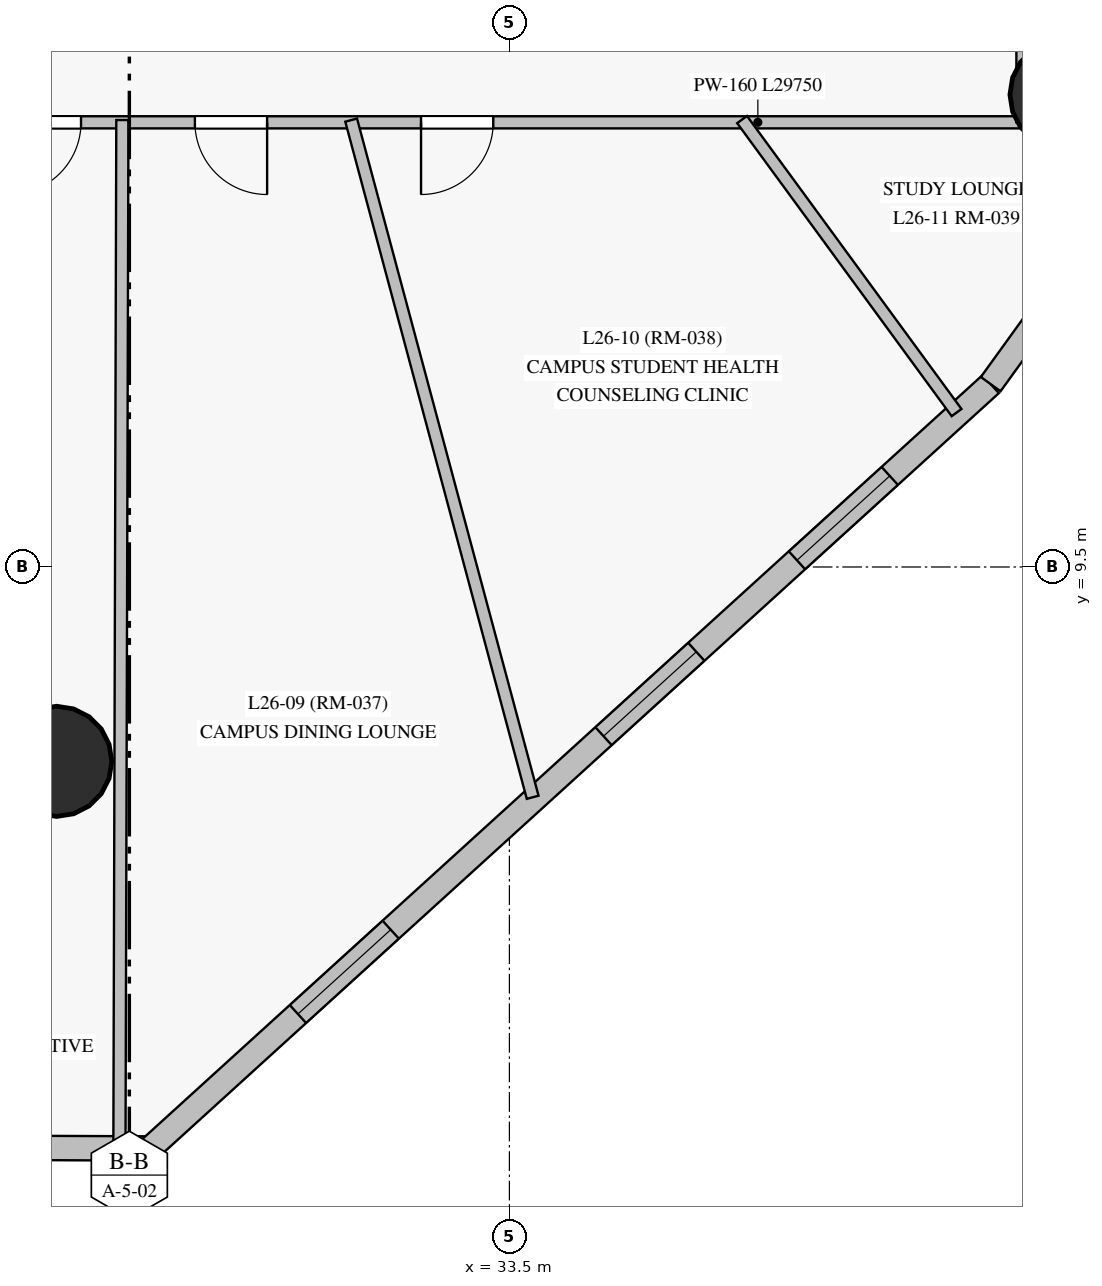
"""IFC4 building model, lengths in metres.
Left out: names, types, materials, properties, quantities, classifications, styles, units other than length and angle.
Written with IfcOpenShell. Run it as: python <this file> out.ifc"""

import sys

from ifc_helpers import new_model, si_unit, direction, frame, frame_2d, origin, origin_with_axes, origin_2d, place, context, subcontext, project, spatial, rectangle, circle, extrude, source, transform, mapped, element, fill, save


model = new_model("IFC4")
c1 = context("Model", 3, precision=1e-05, world=origin(), true_north=direction((0.0, 1.0)))
c2 = subcontext(c1, "Body", "Model", "MODEL_VIEW")
j1 = project(units=[si_unit("LENGTHUNIT", "METRE"), si_unit("PLANEANGLEUNIT", "RADIAN")], contexts=[c1])
p1 = place(None, origin())
s1 = spatial("IfcSite", under=j1, at=p1, CompositionType="ELEMENT")
p2 = place(p1, origin())
s2 = spatial("IfcBuilding", under=s1, at=p2, CompositionType="ELEMENT")
p3 = place(p2, frame((0.0, 0.0, 99.25)))
s3 = spatial("IfcBuildingStorey", under=s2, at=p3, CompositionType="ELEMENT", Elevation=99.25)
m1 = source(origin_with_axes(), c2, "Body", "SweptSolid", [
    extrude(circle(Radius=0.725, at=origin_2d()), origin(), (0.0, 0.0, 1.0), 3.05),
])
for number, where, z_axis, x_axis in (
    (1, (27.544, 6.943, 0.0), (0.0, 0.0, 1.0), (1.0, 0.0, 0.0)),
    (2, (40.81, 15.714, 0.0), (0.0, 0.0, 1.0), (1.0, 0.0, 0.0)),
):
    element("IfcColumn", number, at=place(p3, frame(where, z_axis=z_axis, x_axis=x_axis)), inside=s3, PredefinedType="COLUMN", context=c2, shape_type="MappedRepresentation", body=[
        mapped(m1, transform((0.0, 0.0, 0.0), scale=1.0)),
    ])
p4 = place(p3, frame((18.773, 1.894, 0.0), z_axis=(0.0, 0.0, 1.0), x_axis=(0.999990449776, -0.004370395549, 0.0)))
e3 = element("IfcWall", 3, at=p4, inside=s3, PredefinedType="SOLIDWALL", context=c2, shape_type="SweptSolid", body=[
    extrude(rectangle(XDim=9.999, YDim=0.32, at=frame_2d((5.0, 0.0))), origin(), (0.0, 0.0, 1.0), 2.825),
])
p5 = place(p4, frame((1.95, 0.0, 0.85)))
e4 = element("IfcOpeningElement", 4, at=p5, cuts=e3, PredefinedType="OPENING", context=c2, shape_type="SweptSolid", body=[
    extrude(rectangle(XDim=1.65, YDim=1.65, at=frame_2d((0.825, 0.825))), frame((0.0, 0.17, 0.0), z_axis=(0.0, -1.0, 0.0), x_axis=(1.0, 0.0, 0.0)), (0.0, 0.0, 1.0), 0.34),
])
p6 = place(p4, frame((6.41, 0.0, 0.85)))
e5 = element("IfcOpeningElement", 5, at=p6, cuts=e3, PredefinedType="OPENING", context=c2, shape_type="SweptSolid", body=[
    extrude(rectangle(XDim=1.65, YDim=1.65, at=frame_2d((0.825, 0.825))), frame((0.0, 0.17, 0.0), z_axis=(0.0, -1.0, 0.0), x_axis=(1.0, 0.0, 0.0)), (0.0, 0.0, 1.0), 0.34),
])
p7 = place(p3, frame((28.773, 1.85, 0.0), z_axis=(0.0, 0.0, 1.0), x_axis=(0.739889815612, 0.672728073409, 0.0)))
e6 = element("IfcWall", 6, at=p7, inside=s3, PredefinedType="SOLIDWALL", context=c2, shape_type="SweptSolid", body=[
    extrude(rectangle(XDim=14.948, YDim=0.32, at=frame_2d((7.474, 0.0))), origin(), (0.0, 0.0, 1.0), 2.825),
])
p8 = place(p7, frame((2.629, 0.0, 0.85)))
e7 = element("IfcOpeningElement", 7, at=p8, cuts=e6, PredefinedType="OPENING", context=c2, shape_type="SweptSolid", body=[
    extrude(rectangle(XDim=1.65, YDim=1.65, at=frame_2d((0.825, 0.825))), frame((0.0, 0.17, 0.0), z_axis=(0.0, -1.0, 0.0), x_axis=(1.0, 0.0, 0.0)), (0.0, 0.0, 1.0), 0.34),
])
p9 = place(p7, frame((8.063, 0.0, 0.85)))
e8 = element("IfcOpeningElement", 8, at=p9, cuts=e6, PredefinedType="OPENING", context=c2, shape_type="SweptSolid", body=[
    extrude(rectangle(XDim=1.65, YDim=1.65, at=frame_2d((0.825, 0.825))), frame((0.0, 0.17, 0.0), z_axis=(0.0, -1.0, 0.0), x_axis=(1.0, 0.0, 0.0)), (0.0, 0.0, 1.0), 0.34),
])
p10 = place(p7, frame((11.502, 0.0, 0.85)))
e9 = element("IfcOpeningElement", 9, at=p10, cuts=e6, PredefinedType="OPENING", context=c2, shape_type="SweptSolid", body=[
    extrude(rectangle(XDim=1.65, YDim=1.65, at=frame_2d((0.825, 0.825))), frame((0.0, 0.17, 0.0), z_axis=(0.0, -1.0, 0.0), x_axis=(1.0, 0.0, 0.0)), (0.0, 0.0, 1.0), 0.34),
])
p11 = place(p3, frame((39.832, 11.906, 0.0), z_axis=(0.0, 0.0, 1.0), x_axis=(0.585524008993, 0.810655065298, 0.0)))
e10 = element("IfcWall", 10, at=p11, inside=s3, PredefinedType="SOLIDWALL", context=c2, shape_type="SweptSolid", body=[
    extrude(rectangle(XDim=10.391, YDim=0.32, at=frame_2d((5.196, 0.0))), origin(), (0.0, 0.0, 1.0), 2.825),
])
p12 = place(p11, frame((1.255, 0.0, 0.85)))
e11 = element("IfcOpeningElement", 11, at=p12, cuts=e10, PredefinedType="OPENING", context=c2, shape_type="SweptSolid", body=[
    extrude(rectangle(XDim=1.65, YDim=1.65, at=frame_2d((0.825, 0.825))), frame((0.0, 0.17, 0.0), z_axis=(0.0, -1.0, 0.0), x_axis=(1.0, 0.0, 0.0)), (0.0, 0.0, 1.0), 0.34),
])
p13 = place(p11, frame((4.656, 0.0, 0.85)))
e12 = element("IfcOpeningElement", 12, at=p13, cuts=e10, PredefinedType="OPENING", context=c2, shape_type="SweptSolid", body=[
    extrude(rectangle(XDim=1.65, YDim=1.65, at=frame_2d((0.825, 0.825))), frame((0.0, 0.17, 0.0), z_axis=(0.0, -1.0, 0.0), x_axis=(1.0, 0.0, 0.0)), (0.0, 0.0, 1.0), 0.34),
])
p14 = place(p11, frame((8.091, 0.0, 0.85)))
e13 = element("IfcOpeningElement", 13, at=p14, cuts=e10, PredefinedType="OPENING", context=c2, shape_type="SweptSolid", body=[
    extrude(rectangle(XDim=1.65, YDim=1.65, at=frame_2d((0.825, 0.825))), frame((0.0, 0.17, 0.0), z_axis=(0.0, -1.0, 0.0), x_axis=(1.0, 0.0, 0.0)), (0.0, 0.0, 1.0), 0.34),
])
p15 = place(p3, frame((40.25, 15.35, 0.0), z_axis=(0.0, 0.0, 1.0), x_axis=(-1.0, 0.0, 0.0)))
e14 = element("IfcWall", 14, at=p15, inside=s3, PredefinedType="PARTITIONING", context=c2, shape_type="SweptSolid", body=[
    extrude(rectangle(XDim=29.75, YDim=0.16, at=frame_2d((14.875, 0.0))), origin(), (0.0, 0.0, 1.0), 2.225),
])
p16 = place(p15, frame((24.369, 0.0, 0.0)))
e15 = element("IfcOpeningElement", 15, at=p16, cuts=e14, PredefinedType="OPENING", context=c2, shape_type="SweptSolid", body=[
    extrude(rectangle(XDim=0.95, YDim=2.15, at=frame_2d((0.475, 1.075))), frame((0.0, 0.09, 0.0), z_axis=(0.0, -1.0, 0.0), x_axis=(1.0, 0.0, 0.0)), (0.0, 0.0, 1.0), 0.18),
])
p17 = place(p15, frame((21.498, 0.0, 0.0)))
e16 = element("IfcOpeningElement", 16, at=p17, cuts=e14, PredefinedType="OPENING", context=c2, shape_type="SweptSolid", body=[
    extrude(rectangle(XDim=0.95, YDim=2.15, at=frame_2d((0.475, 1.075))), frame((0.0, 0.09, 0.0), z_axis=(0.0, -1.0, 0.0), x_axis=(1.0, 0.0, 0.0)), (0.0, 0.0, 1.0), 0.18),
])
p18 = place(p15, frame((18.373, 0.0, 0.0)))
e17 = element("IfcOpeningElement", 17, at=p18, cuts=e14, PredefinedType="OPENING", context=c2, shape_type="SweptSolid", body=[
    extrude(rectangle(XDim=0.95, YDim=2.15, at=frame_2d((0.475, 1.075))), frame((0.0, 0.09, 0.0), z_axis=(0.0, -1.0, 0.0), x_axis=(1.0, 0.0, 0.0)), (0.0, 0.0, 1.0), 0.18),
])
p19 = place(p15, frame((16.347, 0.0, 0.0)))
e18 = element("IfcOpeningElement", 18, at=p19, cuts=e14, PredefinedType="OPENING", context=c2, shape_type="SweptSolid", body=[
    extrude(rectangle(XDim=0.95, YDim=2.15, at=frame_2d((0.475, 1.075))), frame((0.0, 0.09, 0.0), z_axis=(0.0, -1.0, 0.0), x_axis=(1.0, 0.0, 0.0)), (0.0, 0.0, 1.0), 0.18),
])
p20 = place(p15, frame((14.4, 0.0, 0.0)))
e19 = element("IfcOpeningElement", 19, at=p20, cuts=e14, PredefinedType="OPENING", context=c2, shape_type="SweptSolid", body=[
    extrude(rectangle(XDim=0.95, YDim=2.15, at=frame_2d((0.475, 1.075))), frame((0.0, 0.09, 0.0), z_axis=(0.0, -1.0, 0.0), x_axis=(1.0, 0.0, 0.0)), (0.0, 0.0, 1.0), 0.18),
])
p21 = place(p15, frame((12.386, 0.0, 0.0)))
e20 = element("IfcOpeningElement", 20, at=p21, cuts=e14, PredefinedType="OPENING", context=c2, shape_type="SweptSolid", body=[
    extrude(rectangle(XDim=0.95, YDim=2.15, at=frame_2d((0.475, 1.075))), frame((0.0, 0.09, 0.0), z_axis=(0.0, -1.0, 0.0), x_axis=(1.0, 0.0, 0.0)), (0.0, 0.0, 1.0), 0.18),
])
p22 = place(p15, frame((9.938, 0.0, 0.0)))
e21 = element("IfcOpeningElement", 21, at=p22, cuts=e14, PredefinedType="OPENING", context=c2, shape_type="SweptSolid", body=[
    extrude(rectangle(XDim=0.95, YDim=2.15, at=frame_2d((0.475, 1.075))), frame((0.0, 0.09, 0.0), z_axis=(0.0, -1.0, 0.0), x_axis=(1.0, 0.0, 0.0)), (0.0, 0.0, 1.0), 0.18),
])
p23 = place(p15, frame((6.962, 0.0, 0.0)))
e22 = element("IfcOpeningElement", 22, at=p23, cuts=e14, PredefinedType="OPENING", context=c2, shape_type="SweptSolid", body=[
    extrude(rectangle(XDim=0.95, YDim=2.15, at=frame_2d((0.475, 1.075))), frame((0.0, 0.09, 0.0), z_axis=(0.0, -1.0, 0.0), x_axis=(1.0, 0.0, 0.0)), (0.0, 0.0, 1.0), 0.18),
])
p24 = place(p3, frame((40.25, 37.65, 0.0), z_axis=(0.0, 0.0, 1.0), x_axis=(0.0, -1.0, 0.0)))
e23 = element("IfcWall", 23, at=p24, inside=s3, PredefinedType="PARTITIONING", context=c2, shape_type="SweptSolid", body=[
    extrude(rectangle(XDim=22.3, YDim=0.16, at=frame_2d((11.15, 0.0))), origin(), (0.0, 0.0, 1.0), 2.225),
])
p25 = place(p24, frame((18.866, 0.0, 0.0)))
e24 = element("IfcOpeningElement", 24, at=p25, cuts=e23, PredefinedType="OPENING", context=c2, shape_type="SweptSolid", body=[
    extrude(rectangle(XDim=0.95, YDim=2.15, at=frame_2d((0.475, 1.075))), frame((0.0, 0.09, 0.0), z_axis=(0.0, -1.0, 0.0), x_axis=(1.0, 0.0, 0.0)), (0.0, 0.0, 1.0), 0.18),
])
p26 = place(p24, frame((11.015, 0.0, 0.0)))
e25 = element("IfcOpeningElement", 25, at=p26, cuts=e23, PredefinedType="OPENING", context=c2, shape_type="SweptSolid", body=[
    extrude(rectangle(XDim=0.95, YDim=2.15, at=frame_2d((0.475, 1.075))), frame((0.0, 0.09, 0.0), z_axis=(0.0, -1.0, 0.0), x_axis=(1.0, 0.0, 0.0)), (0.0, 0.0, 1.0), 0.18),
])
p27 = place(p24, frame((8.866, 0.0, 0.0)))
e26 = element("IfcOpeningElement", 26, at=p27, cuts=e23, PredefinedType="OPENING", context=c2, shape_type="SweptSolid", body=[
    extrude(rectangle(XDim=0.95, YDim=2.15, at=frame_2d((0.475, 1.075))), frame((0.0, 0.09, 0.0), z_axis=(0.0, -1.0, 0.0), x_axis=(1.0, 0.0, 0.0)), (0.0, 0.0, 1.0), 0.18),
])
p28 = place(p24, frame((6.84, 0.0, 0.0)))
e27 = element("IfcOpeningElement", 27, at=p28, cuts=e23, PredefinedType="OPENING", context=c2, shape_type="SweptSolid", body=[
    extrude(rectangle(XDim=0.95, YDim=2.15, at=frame_2d((0.475, 1.075))), frame((0.0, 0.09, 0.0), z_axis=(0.0, -1.0, 0.0), x_axis=(1.0, 0.0, 0.0)), (0.0, 0.0, 1.0), 0.18),
])
p29 = place(p24, frame((4.56, 0.0, 0.0)))
e28 = element("IfcOpeningElement", 28, at=p29, cuts=e23, PredefinedType="OPENING", context=c2, shape_type="SweptSolid", body=[
    extrude(rectangle(XDim=0.95, YDim=2.15, at=frame_2d((0.475, 1.075))), frame((0.0, 0.09, 0.0), z_axis=(0.0, -1.0, 0.0), x_axis=(1.0, 0.0, 0.0)), (0.0, 0.0, 1.0), 0.18),
])
p30 = place(p24, frame((0.915, 0.0, 0.0)))
e29 = element("IfcOpeningElement", 29, at=p30, cuts=e23, PredefinedType="OPENING", context=c2, shape_type="SweptSolid", body=[
    extrude(rectangle(XDim=0.95, YDim=2.15, at=frame_2d((0.475, 1.075))), frame((0.0, 0.09, 0.0), z_axis=(0.0, -1.0, 0.0), x_axis=(1.0, 0.0, 0.0)), (0.0, 0.0, 1.0), 0.18),
])
p31 = place(p3, frame((28.408, 15.38, 0.0), z_axis=(0.0, 0.0, 1.0), x_axis=(-0.002856666281, -0.999995919721, 0.0)))
e30 = element("IfcWall", 30, at=p31, inside=s3, PredefinedType="PARTITIONING", context=c2, shape_type="SweptSolid", body=[
    extrude(rectangle(XDim=13.503, YDim=0.16, at=frame_2d((6.751, 0.0))), origin(), (0.0, 0.0, 1.0), 2.825),
])
p32 = place(p3, frame((31.418, 15.379, 0.0), z_axis=(0.0, 0.0, 1.0), x_axis=(0.258881626797, -0.965909055402, 0.0)))
e31 = element("IfcWall", 31, at=p32, inside=s3, PredefinedType="PARTITIONING", context=c2, shape_type="SweptSolid", body=[
    extrude(rectangle(XDim=9.223, YDim=0.16, at=frame_2d((4.612, 0.0))), origin(), (0.0, 0.0, 1.0), 2.825),
])
p33 = place(p3, frame((36.561, 15.386, 0.0), z_axis=(0.0, 0.0, 1.0), x_axis=(0.590678841896, -0.806906751574, 0.0)))
e32 = element("IfcWall", 32, at=p33, inside=s3, PredefinedType="PARTITIONING", context=c2, shape_type="SweptSolid", body=[
    extrude(rectangle(XDim=4.777, YDim=0.16, at=frame_2d((2.389, 0.0))), origin(), (0.0, 0.0, 1.0), 2.825),
])
m2 = source(origin_with_axes(), c2, "Body", "SweptSolid", [
    extrude(rectangle(XDim=1.65, YDim=1.65, at=frame_2d((0.825, 0.825))), frame((0.0, 0.03, 0.0), z_axis=(0.0, -1.0, 0.0), x_axis=(1.0, 0.0, 0.0)), (0.0, 0.0, 1.0), 0.06),
])
p34 = place(p8, origin())
e33 = element("IfcWindow", 33, at=p34, inside=s3, PartitioningType="SINGLE_PANEL", PredefinedType="WINDOW", context=c2, shape_type="MappedRepresentation", body=[
    mapped(m2, transform((0.0, 0.0, 0.0), scale=1.0)),
])
fill(e7, e33)
p35 = place(p9, origin())
e34 = element("IfcWindow", 34, at=p35, inside=s3, PartitioningType="SINGLE_PANEL", PredefinedType="WINDOW", context=c2, shape_type="MappedRepresentation", body=[
    mapped(m2, transform((0.0, 0.0, 0.0), scale=1.0)),
])
fill(e8, e34)
p36 = place(p10, origin())
e35 = element("IfcWindow", 35, at=p36, inside=s3, PartitioningType="SINGLE_PANEL", PredefinedType="WINDOW", context=c2, shape_type="MappedRepresentation", body=[
    mapped(m2, transform((0.0, 0.0, 0.0), scale=1.0)),
])
fill(e9, e35)
m3 = source(origin_with_axes(), c2, "Body", "SweptSolid", [
    extrude(rectangle(XDim=0.95, YDim=2.15, at=frame_2d((0.475, 1.075))), frame((0.0, 0.025, 0.0), z_axis=(0.0, -1.0, 0.0), x_axis=(1.0, 0.0, 0.0)), (0.0, 0.0, 1.0), 0.05),
])
p37 = place(p21, origin())
e36 = element("IfcDoor", 36, at=p37, inside=s3, OperationType="SINGLE_SWING_RIGHT", PredefinedType="DOOR", context=c2, shape_type="MappedRepresentation", body=[
    mapped(m3, transform((0.0, 0.0, 0.0), scale=1.0)),
])
fill(e20, e36)
p38 = place(p22, origin())
e37 = element("IfcDoor", 37, at=p38, inside=s3, OperationType="SINGLE_SWING_LEFT", PredefinedType="DOOR", context=c2, shape_type="MappedRepresentation", body=[
    mapped(m3, transform((0.0, 0.0, 0.0), scale=1.0)),
])
fill(e21, e37)
p39 = place(p23, origin())
e38 = element("IfcDoor", 38, at=p39, inside=s3, OperationType="SINGLE_SWING_RIGHT", PredefinedType="DOOR", context=c2, shape_type="MappedRepresentation", body=[
    mapped(m3, transform((0.0, 0.0, 0.0), scale=1.0)),
])
fill(e22, e38)
save(model, sys.argv[1])
